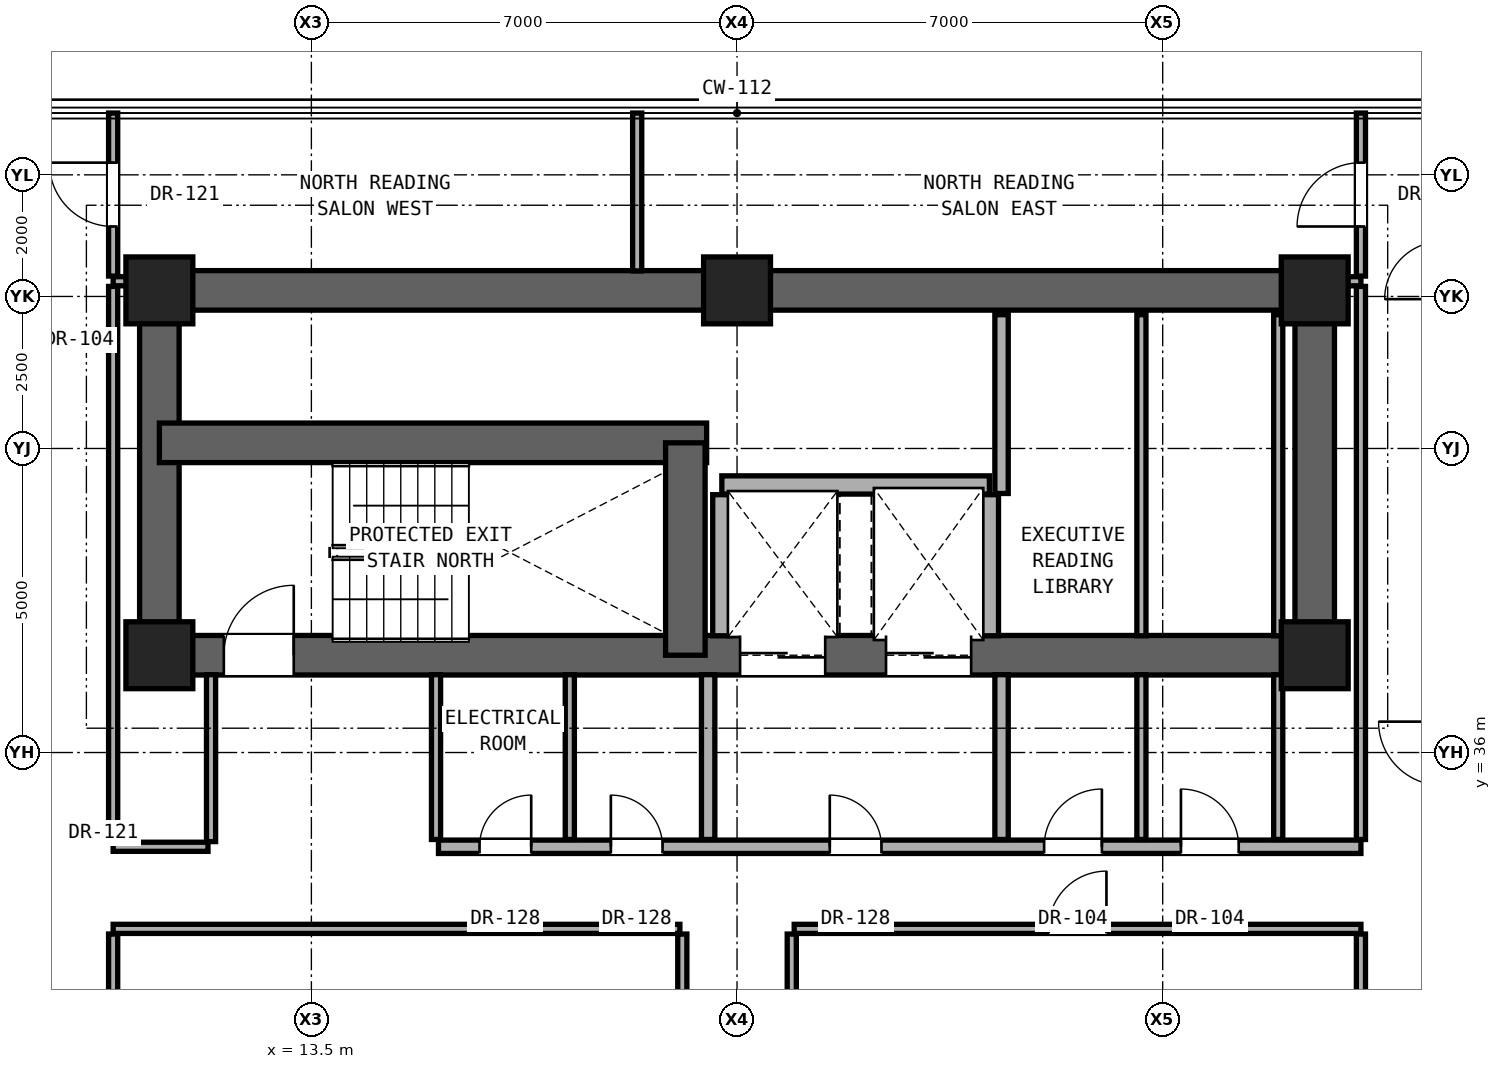
"""IFC4 building model, lengths in metres.
Left out: names, types, materials, properties, quantities, classifications, styles, units other than length and angle.
Written with IfcOpenShell. Run it as: python <this file> out.ifc"""

import sys

from ifc_helpers import new_model, si_unit, direction, frame, frame_2d, origin, origin_2d, place, context, subcontext, project, spatial, rectangle, extrude, element, fill, save


model = new_model("IFC4")
c1 = context("Model", 3, precision=1e-05, world=origin(), true_north=direction((0.0, 1.0)))
c2 = subcontext(c1, "Body", "Model", "MODEL_VIEW")
j1 = project(units=[si_unit("LENGTHUNIT", "METRE"), si_unit("PLANEANGLEUNIT", "RADIAN")], contexts=[c1])
p1 = place(None, origin())
s1 = spatial("IfcSite", under=j1, at=p1, CompositionType="ELEMENT")
p2 = place(p1, origin())
s2 = spatial("IfcBuilding", under=s1, at=p2, CompositionType="ELEMENT")
p3 = place(p2, frame((0.0, 0.0, 124.7)))
s3 = spatial("IfcBuildingStorey", under=s2, at=p3, CompositionType="ELEMENT", Elevation=124.7)
for number, where, z_axis, x_axis in (
    (1, (11.0, 37.6, 0.0), (0.0, 0.0, 1.0), (1.0, 0.0, 0.0)),
    (2, (30.0, 37.6, 0.0), (0.0, 0.0, 1.0), (1.0, 0.0, 0.0)),
    (3, (11.0, 43.6, 0.0), (0.0, 0.0, 1.0), (1.0, 0.0, 0.0)),
    (4, (20.5, 43.6, 0.0), (0.0, 0.0, 1.0), (1.0, 0.0, 0.0)),
    (5, (30.0, 43.6, 0.0), (0.0, 0.0, 1.0), (1.0, 0.0, 0.0)),
):
    element("IfcColumn", number, at=place(p3, frame(where, z_axis=z_axis, x_axis=x_axis)), inside=s3, PredefinedType="COLUMN", context=c2, shape_type="SweptSolid", body=[
        extrude(rectangle(XDim=1.1, YDim=1.1, at=origin_2d()), origin(), (0.0, 0.0, 1.0), 3.3),
    ])
p4 = place(p3, frame((11.0, 43.6, 0.0), z_axis=(0.0, 0.0, 1.0), x_axis=(1.0, 0.0, 0.0)))
e6 = element("IfcWall", 6, at=p4, inside=s3, PredefinedType="SHEAR", context=c2, shape_type="SweptSolid", body=[
    extrude(rectangle(XDim=19.0, YDim=0.65, at=frame_2d((9.5, 0.0))), origin(), (0.0, 0.0, 1.0), 3.08),
])
for number, where, z_axis, x_axis in (
    (7, (11.0, 37.6, 0.0), (0.0, 0.0, 1.0), (0.0, 1.0, 0.0)),
    (8, (30.0, 37.6, 0.0), (0.0, 0.0, 1.0), (0.0, 1.0, 0.0)),
):
    element("IfcWall", number, at=place(p3, frame(where, z_axis=z_axis, x_axis=x_axis)), inside=s3, PredefinedType="SHEAR", context=c2, shape_type="SweptSolid", body=[
        extrude(rectangle(XDim=6.0, YDim=0.65, at=frame_2d((3.0, 0.0))), origin(), (0.0, 0.0, 1.0), 3.08),
    ])
p5 = place(p3, frame((11.0, 37.6, 0.0), z_axis=(0.0, 0.0, 1.0), x_axis=(1.0, 0.0, 0.0)))
e9 = element("IfcWall", 9, at=p5, inside=s3, PredefinedType="SHEAR", context=c2, shape_type="SweptSolid", body=[
    extrude(rectangle(XDim=19.0, YDim=0.65, at=frame_2d((9.5, 0.0))), origin(), (0.0, 0.0, 1.0), 3.08),
])
p6 = place(p5, frame((1.06, 0.0, 0.0)))
e10 = element("IfcOpeningElement", 10, at=p6, cuts=e9, PredefinedType="OPENING", context=c2, shape_type="SweptSolid", body=[
    extrude(rectangle(XDim=1.15, YDim=2.2, at=frame_2d((0.575, 1.1))), frame((0.0, 0.335, 0.0), z_axis=(0.0, -1.0, 0.0), x_axis=(1.0, 0.0, 0.0)), (0.0, 0.0, 1.0), 0.67),
])
p7 = place(p5, frame((9.55, 0.0, 0.0)))
e11 = element("IfcOpeningElement", 11, at=p7, cuts=e9, PredefinedType="OPENING", context=c2, shape_type="SweptSolid", body=[
    extrude(rectangle(XDim=1.4, YDim=2.35, at=frame_2d((0.7, 1.175))), frame((0.0, 0.335, 0.0), z_axis=(0.0, -1.0, 0.0), x_axis=(1.0, 0.0, 0.0)), (0.0, 0.0, 1.0), 0.67),
])
p8 = place(p5, frame((11.95, 0.0, 0.0)))
e12 = element("IfcOpeningElement", 12, at=p8, cuts=e9, PredefinedType="OPENING", context=c2, shape_type="SweptSolid", body=[
    extrude(rectangle(XDim=1.4, YDim=2.35, at=frame_2d((0.7, 1.175))), frame((0.0, 0.335, 0.0), z_axis=(0.0, -1.0, 0.0), x_axis=(1.0, 0.0, 0.0)), (0.0, 0.0, 1.0), 0.67),
])
p9 = place(p3, frame((11.0, 41.093, 0.0), z_axis=(0.0, 0.0, 1.0), x_axis=(1.0, 0.0, 0.0)))
e13 = element("IfcWall", 13, at=p9, inside=s3, PredefinedType="SHEAR", context=c2, shape_type="SweptSolid", body=[
    extrude(rectangle(XDim=9.0, YDim=0.65, at=frame_2d((4.5, 0.0))), origin(), (0.0, 0.0, 1.0), 3.08),
])
p10 = place(p3, frame((19.65, 37.6, 0.0), z_axis=(0.0, 0.0, 1.0), x_axis=(0.0, 1.0, 0.0)))
e14 = element("IfcWall", 14, at=p10, inside=s3, PredefinedType="SHEAR", context=c2, shape_type="SweptSolid", body=[
    extrude(rectangle(XDim=3.493, YDim=0.65, at=frame_2d((1.747, 0.0))), origin(), (0.0, 0.0, 1.0), 3.08),
])
p11 = place(p3, frame((10.24, 33.1, 0.0), z_axis=(0.0, 0.0, 1.0), x_axis=(1.0, 0.0, 0.0)))
e15 = element("IfcWall", 15, at=p11, inside=s3, PredefinedType="PARTITIONING", context=c2, shape_type="SweptSolid", body=[
    extrude(rectangle(XDim=9.32, YDim=0.15, at=frame_2d((4.66, 0.0))), origin(), (0.0, 0.0, 1.0), 2.216),
])
p12 = place(p3, frame((21.44, 33.1, 0.0), z_axis=(0.0, 0.0, 1.0), x_axis=(1.0, 0.0, 0.0)))
e16 = element("IfcWall", 16, at=p12, inside=s3, PredefinedType="PARTITIONING", context=c2, shape_type="SweptSolid", body=[
    extrude(rectangle(XDim=9.32, YDim=0.15, at=frame_2d((4.66, 0.0))), origin(), (0.0, 0.0, 1.0), 2.216),
])
p13 = place(p12, frame((4.185, 0.0, 0.0)))
e17 = element("IfcOpeningElement", 17, at=p13, cuts=e16, PredefinedType="OPENING", context=c2, shape_type="SweptSolid", body=[
    extrude(rectangle(XDim=0.95, YDim=2.15, at=frame_2d((0.475, 1.075))), frame((0.0, 0.085, 0.0), z_axis=(0.0, -1.0, 0.0), x_axis=(1.0, 0.0, 0.0)), (0.0, 0.0, 1.0), 0.17),
])
p14 = place(p3, frame((10.24, 34.45, 0.0), z_axis=(0.0, 0.0, 1.0), x_axis=(1.0, 0.0, 0.0)))
e18 = element("IfcWall", 18, at=p14, inside=s3, PredefinedType="PARTITIONING", context=c2, shape_type="SweptSolid", body=[
    extrude(rectangle(XDim=1.56, YDim=0.15, at=frame_2d((0.78, 0.0))), origin(), (0.0, 0.0, 1.0), 2.216),
])
p15 = place(p3, frame((15.59, 34.45, 0.0), z_axis=(0.0, 0.0, 1.0), x_axis=(1.0, 0.0, 0.0)))
e19 = element("IfcWall", 19, at=p15, inside=s3, PredefinedType="SOLIDWALL", context=c2, shape_type="SweptSolid", body=[
    extrude(rectangle(XDim=15.17, YDim=0.22, at=frame_2d((7.585, 0.0))), origin(), (0.0, 0.0, 1.0), 2.216),
])
p16 = place(p15, frame((6.435, 0.0, 0.0)))
e20 = element("IfcOpeningElement", 20, at=p16, cuts=e19, PredefinedType="OPENING", context=c2, shape_type="SweptSolid", body=[
    extrude(rectangle(XDim=0.85, YDim=2.01, at=frame_2d((0.425, 1.005))), frame((0.0, 0.12, 0.0), z_axis=(0.0, -1.0, 0.0), x_axis=(1.0, 0.0, 0.0)), (0.0, 0.0, 1.0), 0.24),
])
p17 = place(p15, frame((9.96, 0.0, 0.0)))
e21 = element("IfcOpeningElement", 21, at=p17, cuts=e19, PredefinedType="OPENING", context=c2, shape_type="SweptSolid", body=[
    extrude(rectangle(XDim=0.95, YDim=2.15, at=frame_2d((0.475, 1.075))), frame((0.0, 0.12, 0.0), z_axis=(0.0, -1.0, 0.0), x_axis=(1.0, 0.0, 0.0)), (0.0, 0.0, 1.0), 0.24),
])
p18 = place(p15, frame((12.21, 0.0, 0.0)))
e22 = element("IfcOpeningElement", 22, at=p18, cuts=e19, PredefinedType="OPENING", context=c2, shape_type="SweptSolid", body=[
    extrude(rectangle(XDim=0.95, YDim=2.15, at=frame_2d((0.475, 1.075))), frame((0.0, 0.12, 0.0), z_axis=(0.0, -1.0, 0.0), x_axis=(1.0, 0.0, 0.0)), (0.0, 0.0, 1.0), 0.24),
])
p19 = place(p15, frame((0.675, 0.0, 0.0)))
e23 = element("IfcOpeningElement", 23, at=p19, cuts=e19, PredefinedType="OPENING", context=c2, shape_type="SweptSolid", body=[
    extrude(rectangle(XDim=0.85, YDim=2.01, at=frame_2d((0.425, 1.005))), frame((0.0, 0.12, 0.0), z_axis=(0.0, -1.0, 0.0), x_axis=(1.0, 0.0, 0.0)), (0.0, 0.0, 1.0), 0.24),
])
p20 = place(p15, frame((2.835, 0.0, 0.0)))
e24 = element("IfcOpeningElement", 24, at=p20, cuts=e19, PredefinedType="OPENING", context=c2, shape_type="SweptSolid", body=[
    extrude(rectangle(XDim=0.85, YDim=2.01, at=frame_2d((0.425, 1.005))), frame((0.0, 0.12, 0.0), z_axis=(0.0, -1.0, 0.0), x_axis=(1.0, 0.0, 0.0)), (0.0, 0.0, 1.0), 0.24),
])
p21 = place(p3, frame((20.25, 40.4, 0.0), z_axis=(0.0, 0.0, 1.0), x_axis=(1.0, 0.0, 0.0)))
e25 = element("IfcWall", 25, at=p21, inside=s3, PredefinedType="SOLIDWALL", context=c2, shape_type="SweptSolid", body=[
    extrude(rectangle(XDim=4.4, YDim=0.3, at=frame_2d((2.2, 0.0))), origin(), (0.0, 0.0, 1.0), 3.08),
])
for number, where, z_axis, x_axis in (
    (26, (10.24, 43.75, 0.0), (0.0, 0.0, 1.0), (1.0, 0.0, 0.0)),
    (27, (30.32, 43.75, 0.0), (0.0, 0.0, 1.0), (1.0, 0.0, 0.0)),
):
    element("IfcWall", number, at=place(p3, frame(where, z_axis=z_axis, x_axis=x_axis)), inside=s3, PredefinedType="PARTITIONING", context=c2, shape_type="SweptSolid", body=[
        extrude(rectangle(XDim=0.44, YDim=0.15, at=frame_2d((0.22, 0.0))), origin(), (0.0, 0.0, 1.0), 3.08),
    ])
p22 = place(p3, frame((10.24, 27.485, 0.0), z_axis=(0.0, 0.0, 1.0), x_axis=(0.0, 1.0, 0.0)))
e28 = element("IfcWall", 28, at=p22, inside=s3, PredefinedType="PARTITIONING", context=c2, shape_type="SweptSolid", body=[
    extrude(rectangle(XDim=5.53, YDim=0.15, at=frame_2d((2.765, 0.0))), origin(), (0.0, 0.0, 1.0), 2.299),
])
p23 = place(p22, frame((2.29, 0.0, 0.0)))
e29 = element("IfcOpeningElement", 29, at=p23, cuts=e28, PredefinedType="OPENING", context=c2, shape_type="SweptSolid", body=[
    extrude(rectangle(XDim=0.95, YDim=2.15, at=frame_2d((0.475, 1.075))), frame((0.0, 0.085, 0.0), z_axis=(0.0, -1.0, 0.0), x_axis=(1.0, 0.0, 0.0)), (0.0, 0.0, 1.0), 0.17),
])
p24 = place(p3, frame((10.24, 34.535, 0.0), z_axis=(0.0, 0.0, 1.0), x_axis=(0.0, 1.0, 0.0)))
e30 = element("IfcWall", 30, at=p24, inside=s3, PredefinedType="PARTITIONING", context=c2, shape_type="SweptSolid", body=[
    extrude(rectangle(XDim=9.13, YDim=0.15, at=frame_2d((4.565, 0.0))), origin(), (0.0, 0.0, 1.0), 2.456),
])
p25 = place(p3, frame((10.24, 43.835, 0.0), z_axis=(0.0, 0.0, 1.0), x_axis=(0.0, 1.0, 0.0)))
e31 = element("IfcWall", 31, at=p25, inside=s3, PredefinedType="PARTITIONING", context=c2, shape_type="SweptSolid", body=[
    extrude(rectangle(XDim=2.681, YDim=0.15, at=frame_2d((1.341, 0.0))), origin(), (0.0, 0.0, 1.0), 3.08),
])
p26 = place(p25, frame((0.815, 0.0, 0.0)))
e32 = element("IfcOpeningElement", 32, at=p26, cuts=e31, PredefinedType="OPENING", context=c2, shape_type="SweptSolid", body=[
    extrude(rectangle(XDim=1.05, YDim=2.2, at=frame_2d((0.525, 1.1))), frame((0.0, 0.085, 0.0), z_axis=(0.0, -1.0, 0.0), x_axis=(1.0, 0.0, 0.0)), (0.0, 0.0, 1.0), 0.17),
])
p27 = place(p3, frame((11.85, 34.535, 0.0), z_axis=(0.0, 0.0, 1.0), x_axis=(0.0, 1.0, 0.0)))
e33 = element("IfcWall", 33, at=p27, inside=s3, PredefinedType="PARTITIONING", context=c2, shape_type="SweptSolid", body=[
    extrude(rectangle(XDim=2.745, YDim=0.15, at=frame_2d((1.373, 0.0))), origin(), (0.0, 0.0, 1.0), 3.08),
])
p28 = place(p3, frame((15.55, 34.57, 0.0), z_axis=(0.0, 0.0, 1.0), x_axis=(0.0, 1.0, 0.0)))
e34 = element("IfcWall", 34, at=p28, inside=s3, PredefinedType="PARTITIONING", context=c2, shape_type="SweptSolid", body=[
    extrude(rectangle(XDim=2.71, YDim=0.15, at=frame_2d((1.355, 0.0))), origin(), (0.0, 0.0, 1.0), 2.609),
])
p29 = place(p3, frame((17.75, 34.57, 0.0), z_axis=(0.0, 0.0, 1.0), x_axis=(0.0, 1.0, 0.0)))
e35 = element("IfcWall", 35, at=p29, inside=s3, PredefinedType="PARTITIONING", context=c2, shape_type="SweptSolid", body=[
    extrude(rectangle(XDim=2.71, YDim=0.15, at=frame_2d((1.355, 0.0))), origin(), (0.0, 0.0, 1.0), 3.08),
])
p30 = place(p3, frame((18.858, 43.92, 0.0), z_axis=(0.0, 0.0, 1.0), x_axis=(0.0, 1.0, 0.0)))
e36 = element("IfcWall", 36, at=p30, inside=s3, PredefinedType="PARTITIONING", context=c2, shape_type="SweptSolid", body=[
    extrude(rectangle(XDim=2.596, YDim=0.15, at=frame_2d((1.298, 0.0))), origin(), (0.0, 0.0, 1.0), 3.08),
])
p31 = place(p3, frame((19.6, 27.485, 0.0), z_axis=(0.0, 0.0, 1.0), x_axis=(0.0, 1.0, 0.0)))
e37 = element("IfcWall", 37, at=p31, inside=s3, PredefinedType="PARTITIONING", context=c2, shape_type="SweptSolid", body=[
    extrude(rectangle(XDim=5.53, YDim=0.15, at=frame_2d((2.765, 0.0))), origin(), (0.0, 0.0, 1.0), 2.216),
])
p32 = place(p3, frame((20.025, 34.57, 0.0), z_axis=(0.0, 0.0, 1.0), x_axis=(0.0, 1.0, 0.0)))
e38 = element("IfcWall", 38, at=p32, inside=s3, PredefinedType="SOLIDWALL", context=c2, shape_type="SweptSolid", body=[
    extrude(rectangle(XDim=2.71, YDim=0.22, at=frame_2d((1.355, 0.0))), origin(), (0.0, 0.0, 1.0), 3.08),
])
p33 = place(p3, frame((20.25, 37.92, 0.0), z_axis=(0.0, 0.0, 1.0), x_axis=(0.0, 1.0, 0.0)))
e39 = element("IfcWall", 39, at=p33, inside=s3, PredefinedType="SOLIDWALL", context=c2, shape_type="SweptSolid", body=[
    extrude(rectangle(XDim=2.32, YDim=0.3, at=frame_2d((1.16, 0.0))), origin(), (0.0, 0.0, 1.0), 3.08),
])
p34 = place(p3, frame((21.4, 27.485, 0.0), z_axis=(0.0, 0.0, 1.0), x_axis=(0.0, 1.0, 0.0)))
e40 = element("IfcWall", 40, at=p34, inside=s3, PredefinedType="PARTITIONING", context=c2, shape_type="SweptSolid", body=[
    extrude(rectangle(XDim=5.53, YDim=0.15, at=frame_2d((2.765, 0.0))), origin(), (0.0, 0.0, 1.0), 2.216),
])
p35 = place(p3, frame((24.65, 37.92, 0.0), z_axis=(0.0, 0.0, 1.0), x_axis=(0.0, 1.0, 0.0)))
e41 = element("IfcWall", 41, at=p35, inside=s3, PredefinedType="SOLIDWALL", context=c2, shape_type="SweptSolid", body=[
    extrude(rectangle(XDim=2.32, YDim=0.3, at=frame_2d((1.16, 0.0))), origin(), (0.0, 0.0, 1.0), 3.08),
])
p36 = place(p3, frame((24.85, 34.57, 0.0), z_axis=(0.0, 0.0, 1.0), x_axis=(0.0, 1.0, 0.0)))
e42 = element("IfcWall", 42, at=p36, inside=s3, PredefinedType="SOLIDWALL", context=c2, shape_type="SweptSolid", body=[
    extrude(rectangle(XDim=2.71, YDim=0.22, at=frame_2d((1.355, 0.0))), origin(), (0.0, 0.0, 1.0), 3.08),
])
p37 = place(p3, frame((24.85, 40.26, 0.0), z_axis=(0.0, 0.0, 1.0), x_axis=(0.0, 1.0, 0.0)))
e43 = element("IfcWall", 43, at=p37, inside=s3, PredefinedType="SOLIDWALL", context=c2, shape_type="SweptSolid", body=[
    extrude(rectangle(XDim=2.94, YDim=0.22, at=frame_2d((1.47, 0.0))), origin(), (0.0, 0.0, 1.0), 3.08),
])
p38 = place(p3, frame((27.15, 34.57, 0.0), z_axis=(0.0, 0.0, 1.0), x_axis=(0.0, 1.0, 0.0)))
e44 = element("IfcWall", 44, at=p38, inside=s3, PredefinedType="PARTITIONING", context=c2, shape_type="SweptSolid", body=[
    extrude(rectangle(XDim=2.71, YDim=0.15, at=frame_2d((1.355, 0.0))), origin(), (0.0, 0.0, 1.0), 3.08),
])
p39 = place(p3, frame((27.15, 37.92, 0.0), z_axis=(0.0, 0.0, 1.0), x_axis=(0.0, 1.0, 0.0)))
e45 = element("IfcWall", 45, at=p39, inside=s3, PredefinedType="PARTITIONING", context=c2, shape_type="SweptSolid", body=[
    extrude(rectangle(XDim=5.28, YDim=0.15, at=frame_2d((2.64, 0.0))), origin(), (0.0, 0.0, 1.0), 3.08),
])
p40 = place(p3, frame((29.4, 34.57, 0.0), z_axis=(0.0, 0.0, 1.0), x_axis=(0.0, 1.0, 0.0)))
e46 = element("IfcWall", 46, at=p40, inside=s3, PredefinedType="PARTITIONING", context=c2, shape_type="SweptSolid", body=[
    extrude(rectangle(XDim=2.71, YDim=0.15, at=frame_2d((1.355, 0.0))), origin(), (0.0, 0.0, 1.0), 3.08),
])
p41 = place(p3, frame((29.4, 37.92, 0.0), z_axis=(0.0, 0.0, 1.0), x_axis=(0.0, 1.0, 0.0)))
e47 = element("IfcWall", 47, at=p41, inside=s3, PredefinedType="PARTITIONING", context=c2, shape_type="SweptSolid", body=[
    extrude(rectangle(XDim=5.28, YDim=0.15, at=frame_2d((2.64, 0.0))), origin(), (0.0, 0.0, 1.0), 3.08),
])
p42 = place(p3, frame((30.76, 27.485, 0.0), z_axis=(0.0, 0.0, 1.0), x_axis=(0.0, 1.0, 0.0)))
e48 = element("IfcWall", 48, at=p42, inside=s3, PredefinedType="PARTITIONING", context=c2, shape_type="SweptSolid", body=[
    extrude(rectangle(XDim=5.53, YDim=0.15, at=frame_2d((2.765, 0.0))), origin(), (0.0, 0.0, 1.0), 2.299),
])
p43 = place(p3, frame((30.76, 34.57, 0.0), z_axis=(0.0, 0.0, 1.0), x_axis=(0.0, 1.0, 0.0)))
e49 = element("IfcWall", 49, at=p43, inside=s3, PredefinedType="PARTITIONING", context=c2, shape_type="SweptSolid", body=[
    extrude(rectangle(XDim=9.095, YDim=0.15, at=frame_2d((4.547, 0.0))), origin(), (0.0, 0.0, 1.0), 2.456),
])
p44 = place(p3, frame((30.76, 43.835, 0.0), z_axis=(0.0, 0.0, 1.0), x_axis=(0.0, 1.0, 0.0)))
e50 = element("IfcWall", 50, at=p44, inside=s3, PredefinedType="PARTITIONING", context=c2, shape_type="SweptSolid", body=[
    extrude(rectangle(XDim=2.681, YDim=0.15, at=frame_2d((1.341, 0.0))), origin(), (0.0, 0.0, 1.0), 3.08),
])
p45 = place(p44, frame((0.815, 0.0, 0.0)))
e51 = element("IfcOpeningElement", 51, at=p45, cuts=e50, PredefinedType="OPENING", context=c2, shape_type="SweptSolid", body=[
    extrude(rectangle(XDim=1.05, YDim=2.2, at=frame_2d((0.525, 1.1))), frame((0.0, 0.085, 0.0), z_axis=(0.0, -1.0, 0.0), x_axis=(1.0, 0.0, 0.0)), (0.0, 0.0, 1.0), 0.17),
])
p46 = place(p6, origin())
e52 = element("IfcDoor", 52, at=p46, inside=s3, OperationType="SINGLE_SWING_RIGHT", PredefinedType="DOOR", context=c2, shape_type="SweptSolid", body=[
    extrude(rectangle(XDim=1.15, YDim=2.2, at=frame_2d((0.575, 1.1))), frame((0.0, 0.025, 0.0), z_axis=(0.0, -1.0, 0.0), x_axis=(1.0, 0.0, 0.0)), (0.0, 0.0, 1.0), 0.05),
])
fill(e10, e52)
p47 = place(p16, origin())
e53 = element("IfcDoor", 53, at=p47, inside=s3, OperationType="SINGLE_SWING_LEFT", PredefinedType="DOOR", context=c2, shape_type="SweptSolid", body=[
    extrude(rectangle(XDim=0.85, YDim=2.01, at=frame_2d((0.425, 1.005))), frame((0.0, 0.025, 0.0), z_axis=(0.0, -1.0, 0.0), x_axis=(1.0, 0.0, 0.0)), (0.0, 0.0, 1.0), 0.05),
])
fill(e20, e53)
p48 = place(p17, origin())
e54 = element("IfcDoor", 54, at=p48, inside=s3, OperationType="SINGLE_SWING_RIGHT", PredefinedType="DOOR", context=c2, shape_type="SweptSolid", body=[
    extrude(rectangle(XDim=0.95, YDim=2.15, at=frame_2d((0.475, 1.075))), frame((0.0, 0.025, 0.0), z_axis=(0.0, -1.0, 0.0), x_axis=(1.0, 0.0, 0.0)), (0.0, 0.0, 1.0), 0.05),
])
fill(e21, e54)
p49 = place(p18, origin())
e55 = element("IfcDoor", 55, at=p49, inside=s3, OperationType="SINGLE_SWING_LEFT", PredefinedType="DOOR", context=c2, shape_type="SweptSolid", body=[
    extrude(rectangle(XDim=0.95, YDim=2.15, at=frame_2d((0.475, 1.075))), frame((0.0, 0.025, 0.0), z_axis=(0.0, -1.0, 0.0), x_axis=(1.0, 0.0, 0.0)), (0.0, 0.0, 1.0), 0.05),
])
fill(e22, e55)
p50 = place(p19, origin())
e56 = element("IfcDoor", 56, at=p50, inside=s3, OperationType="SINGLE_SWING_RIGHT", PredefinedType="DOOR", context=c2, shape_type="SweptSolid", body=[
    extrude(rectangle(XDim=0.85, YDim=2.01, at=frame_2d((0.425, 1.005))), frame((0.0, 0.025, 0.0), z_axis=(0.0, -1.0, 0.0), x_axis=(1.0, 0.0, 0.0)), (0.0, 0.0, 1.0), 0.05),
])
fill(e23, e56)
p51 = place(p20, origin())
e57 = element("IfcDoor", 57, at=p51, inside=s3, OperationType="SINGLE_SWING_LEFT", PredefinedType="DOOR", context=c2, shape_type="SweptSolid", body=[
    extrude(rectangle(XDim=0.85, YDim=2.01, at=frame_2d((0.425, 1.005))), frame((0.0, 0.025, 0.0), z_axis=(0.0, -1.0, 0.0), x_axis=(1.0, 0.0, 0.0)), (0.0, 0.0, 1.0), 0.05),
])
fill(e24, e57)
p52 = place(p13, origin())
e58 = element("IfcDoor", 58, at=p52, inside=s3, OperationType="SINGLE_SWING_RIGHT", PredefinedType="DOOR", context=c2, shape_type="SweptSolid", body=[
    extrude(rectangle(XDim=0.95, YDim=2.15, at=frame_2d((0.475, 1.075))), frame((0.0, 0.025, 0.0), z_axis=(0.0, -1.0, 0.0), x_axis=(1.0, 0.0, 0.0)), (0.0, 0.0, 1.0), 0.05),
])
fill(e17, e58)
p53 = place(p26, origin())
e59 = element("IfcDoor", 59, at=p53, inside=s3, OperationType="SINGLE_SWING_RIGHT", PredefinedType="DOOR", context=c2, shape_type="SweptSolid", body=[
    extrude(rectangle(XDim=1.05, YDim=2.2, at=frame_2d((0.525, 1.1))), frame((0.0, 0.025, 0.0), z_axis=(0.0, -1.0, 0.0), x_axis=(1.0, 0.0, 0.0)), (0.0, 0.0, 1.0), 0.05),
])
fill(e32, e59)
p54 = place(p45, origin())
e60 = element("IfcDoor", 60, at=p54, inside=s3, OperationType="SINGLE_SWING_LEFT", PredefinedType="DOOR", context=c2, shape_type="SweptSolid", body=[
    extrude(rectangle(XDim=1.05, YDim=2.2, at=frame_2d((0.525, 1.1))), frame((0.0, 0.025, 0.0), z_axis=(0.0, -1.0, 0.0), x_axis=(1.0, 0.0, 0.0)), (0.0, 0.0, 1.0), 0.05),
])
fill(e51, e60)
p55 = place(p7, origin())
e61 = element("IfcDoor", 61, at=p55, inside=s3, OperationType="DOUBLE_DOOR_SLIDING", PredefinedType="DOOR", context=c2, shape_type="SweptSolid", body=[
    extrude(rectangle(XDim=1.4, YDim=2.35, at=frame_2d((0.7, 1.175))), frame((0.0, 0.025, 0.0), z_axis=(0.0, -1.0, 0.0), x_axis=(1.0, 0.0, 0.0)), (0.0, 0.0, 1.0), 0.05),
])
fill(e11, e61)
p56 = place(p8, origin())
e62 = element("IfcDoor", 62, at=p56, inside=s3, OperationType="DOUBLE_DOOR_SLIDING", PredefinedType="DOOR", context=c2, shape_type="SweptSolid", body=[
    extrude(rectangle(XDim=1.4, YDim=2.35, at=frame_2d((0.7, 1.175))), frame((0.0, 0.025, 0.0), z_axis=(0.0, -1.0, 0.0), x_axis=(1.0, 0.0, 0.0)), (0.0, 0.0, 1.0), 0.05),
])
fill(e12, e62)
save(model, sys.argv[1])
